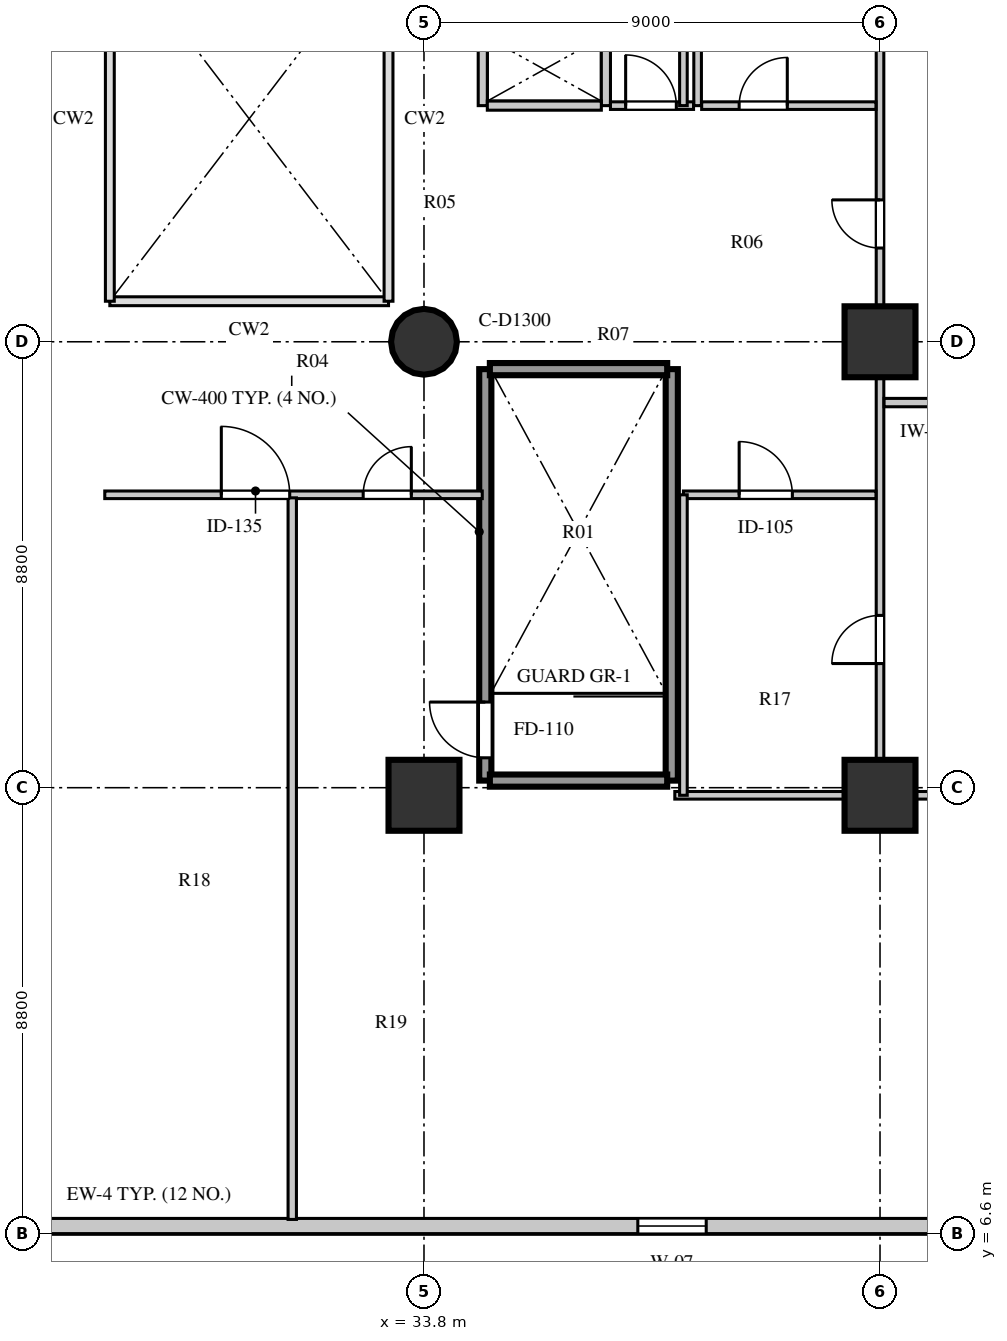
"""IFC4 building model, lengths in metres.
Left out: names, types, materials, properties, quantities, classifications, styles, units other than length and angle.
Written with IfcOpenShell. Run it as: python <this file> out.ifc"""

import sys

from ifc_helpers import new_model, si_unit, direction, frame, frame_2d, origin, origin_2d, place, context, subcontext, project, spatial, rectangle, circle, extrude, element, fill, save


model = new_model("IFC4")
c1 = context("Model", 3, precision=1e-05, world=origin(), true_north=direction((0.0, 1.0)))
c2 = subcontext(c1, "Body", "Model", "MODEL_VIEW")
j1 = project(units=[si_unit("LENGTHUNIT", "METRE"), si_unit("PLANEANGLEUNIT", "RADIAN")], contexts=[c1])
p1 = place(None, origin())
s1 = spatial("IfcSite", under=j1, at=p1, CompositionType="ELEMENT")
p2 = place(p1, origin())
s2 = spatial("IfcBuilding", under=s1, at=p2, CompositionType="ELEMENT")
p3 = place(p2, frame((0.0, 0.0, 21.5)))
s3 = spatial("IfcBuildingStorey", under=s2, at=p3, CompositionType="ELEMENT", Elevation=21.5)
p4 = place(p3, frame((33.8, 15.25, 0.0), z_axis=(0.0, 0.0, 1.0), x_axis=(1.0, 0.0, 0.0)))
e1 = element("IfcColumn", 1, at=p4, inside=s3, PredefinedType="COLUMN", context=c2, shape_type="SweptSolid", body=[
    extrude(rectangle(XDim=1.4, YDim=1.4, at=origin_2d()), origin(), (0.0, 0.0, 1.0), 4.22),
])
p5 = place(p3, frame((33.8, 24.2, 0.0), z_axis=(0.0, 0.0, 1.0), x_axis=(1.0, 0.0, 0.0)))
e2 = element("IfcColumn", 2, at=p5, inside=s3, PredefinedType="COLUMN", context=c2, shape_type="SweptSolid", body=[
    extrude(circle(Radius=0.65, at=origin_2d()), origin(), (0.0, 0.0, 1.0), 4.22),
])
for number, where, z_axis, x_axis in (
    (3, (42.8, 15.25, 0.0), (0.0, 0.0, 1.0), (1.0, 0.0, 0.0)),
    (4, (42.8, 24.2, 0.0), (0.0, 0.0, 1.0), (1.0, 0.0, 0.0)),
):
    element("IfcColumn", number, at=place(p3, frame(where, z_axis=z_axis, x_axis=x_axis)), inside=s3, PredefinedType="COLUMN", context=c2, shape_type="SweptSolid", body=[
        extrude(rectangle(XDim=1.4, YDim=1.4, at=origin_2d()), origin(), (0.0, 0.0, 1.0), 4.22),
    ])
p6 = place(p3, frame((12.3, 6.75, 0.0), z_axis=(0.0, 0.0, 1.0), x_axis=(1.0, 0.0, 0.0)))
e5 = element("IfcWall", 5, at=p6, inside=s3, PredefinedType="STANDARD", context=c2, shape_type="SweptSolid", body=[
    extrude(rectangle(XDim=34.0, YDim=0.3, at=frame_2d((17.0, 0.0))), origin(), (0.0, 0.0, 1.0), 4.22),
])
p7 = place(p6, frame((8.455, 0.0, 0.8)))
e6 = element("IfcOpeningElement", 6, at=p7, cuts=e5, PredefinedType="OPENING", context=c2, shape_type="SweptSolid", body=[
    extrude(rectangle(XDim=2.1, YDim=1.95, at=frame_2d((1.05, 0.975))), frame((0.0, 0.16, 0.0), z_axis=(0.0, -1.0, 0.0), x_axis=(1.0, 0.0, 0.0)), (0.0, 0.0, 1.0), 0.32),
])
p8 = place(p6, frame((25.72, 0.0, 0.8)))
e7 = element("IfcOpeningElement", 7, at=p8, cuts=e5, PredefinedType="OPENING", context=c2, shape_type="SweptSolid", body=[
    extrude(rectangle(XDim=1.35, YDim=1.9, at=frame_2d((0.675, 0.95))), frame((0.0, 0.16, 0.0), z_axis=(0.0, -1.0, 0.0), x_axis=(1.0, 0.0, 0.0)), (0.0, 0.0, 1.0), 0.32),
])
p9 = place(p3, frame((34.96, 28.86, 0.0), z_axis=(0.0, 0.0, 1.0), x_axis=(0.0, 1.0, 0.0)))
e8 = element("IfcWall", 8, at=p9, inside=s3, PredefinedType="SOLIDWALL", context=c2, shape_type="SweptSolid", body=[
    extrude(rectangle(XDim=4.22, YDim=0.18, at=frame_2d((2.11, 0.0))), origin(), (0.0, 0.0, 1.0), 4.22),
])
p10 = place(p3, frame((37.39, 28.86, 0.0), z_axis=(0.0, 0.0, 1.0), x_axis=(0.0, 1.0, 0.0)))
e9 = element("IfcWall", 9, at=p10, inside=s3, PredefinedType="SOLIDWALL", context=c2, shape_type="SweptSolid", body=[
    extrude(rectangle(XDim=4.22, YDim=0.18, at=frame_2d((2.11, 0.0))), origin(), (0.0, 0.0, 1.0), 4.22),
])
p11 = place(p10, frame((2.1, 0.0, 0.0)))
e10 = element("IfcOpeningElement", 10, at=p11, cuts=e9, PredefinedType="OPENING", context=c2, shape_type="SweptSolid", body=[
    extrude(rectangle(XDim=1.2, YDim=2.12, at=frame_2d((0.6, 1.06))), frame((0.0, 0.1, 0.0), z_axis=(0.0, -1.0, 0.0), x_axis=(1.0, 0.0, 0.0)), (0.0, 0.0, 1.0), 0.2),
])
p12 = place(p3, frame((35.05, 28.86, 0.0), z_axis=(0.0, 0.0, 1.0), x_axis=(1.0, 0.0, 0.0)))
e11 = element("IfcWall", 11, at=p12, inside=s3, PredefinedType="SOLIDWALL", context=c2, shape_type="SweptSolid", body=[
    extrude(rectangle(XDim=2.25, YDim=0.18, at=frame_2d((1.125, 0.0))), origin(), (0.0, 0.0, 1.0), 4.22),
])
p13 = place(p3, frame((39.2, 28.86, 0.0), z_axis=(0.0, 0.0, 1.0), x_axis=(0.0, 1.0, 0.0)))
e12 = element("IfcWall", 12, at=p13, inside=s3, PredefinedType="PARTITIONING", context=c2, shape_type="SweptSolid", body=[
    extrude(rectangle(XDim=4.22, YDim=0.15, at=frame_2d((2.11, 0.0))), origin(), (0.0, 0.0, 1.0), 4.22),
])
p14 = place(p3, frame((37.48, 28.86, 0.0), z_axis=(0.0, 0.0, 1.0), x_axis=(1.0, 0.0, 0.0)))
e13 = element("IfcWall", 13, at=p14, inside=s3, PredefinedType="PARTITIONING", context=c2, shape_type="SweptSolid", body=[
    extrude(rectangle(XDim=1.64, YDim=0.15, at=frame_2d((0.82, 0.0))), origin(), (0.0, 0.0, 1.0), 4.22),
])
p15 = place(p14, frame((0.3, 0.0, 0.0)))
e14 = element("IfcOpeningElement", 14, at=p15, cuts=e13, PredefinedType="OPENING", context=c2, shape_type="SweptSolid", body=[
    extrude(rectangle(XDim=1.0, YDim=2.1, at=frame_2d((0.5, 1.05))), frame((0.0, 0.085, 0.0), z_axis=(0.0, -1.0, 0.0), x_axis=(1.0, 0.0, 0.0)), (0.0, 0.0, 1.0), 0.17),
])
p16 = place(p3, frame((35.01, 15.54, 0.0), z_axis=(0.0, 0.0, 1.0), x_axis=(0.0, 1.0, 0.0)))
e15 = element("IfcWall", 15, at=p16, inside=s3, PredefinedType="SHEAR", context=c2, shape_type="SweptSolid", body=[
    extrude(rectangle(XDim=8.12, YDim=0.24, at=frame_2d((4.06, 0.0))), origin(), (0.0, 0.0, 1.0), 4.5),
])
p17 = place(p16, frame((0.45, 0.0, 0.0)))
e16 = element("IfcOpeningElement", 16, at=p17, cuts=e15, PredefinedType="OPENING", context=c2, shape_type="SweptSolid", body=[
    extrude(rectangle(XDim=1.1, YDim=2.1, at=frame_2d((0.55, 1.05))), frame((0.0, 0.13, 0.0), z_axis=(0.0, -1.0, 0.0), x_axis=(1.0, 0.0, 0.0)), (0.0, 0.0, 1.0), 0.26),
])
p18 = place(p3, frame((38.69, 15.54, 0.0), z_axis=(0.0, 0.0, 1.0), x_axis=(0.0, 1.0, 0.0)))
e17 = element("IfcWall", 17, at=p18, inside=s3, PredefinedType="SHEAR", context=c2, shape_type="SweptSolid", body=[
    extrude(rectangle(XDim=8.12, YDim=0.24, at=frame_2d((4.06, 0.0))), origin(), (0.0, 0.0, 1.0), 4.5),
])
for number, where, z_axis, x_axis in (
    (18, (35.1, 15.54, 0.0), (0.0, 0.0, 1.0), (1.0, 0.0, 0.0)),
    (19, (35.1, 23.66, 0.0), (0.0, 0.0, 1.0), (1.0, 0.0, 0.0)),
):
    element("IfcWall", number, at=place(p3, frame(where, z_axis=z_axis, x_axis=x_axis)), inside=s3, PredefinedType="SHEAR", context=c2, shape_type="SweptSolid", body=[
        extrude(rectangle(XDim=3.5, YDim=0.24, at=frame_2d((1.75, 0.0))), origin(), (0.0, 0.0, 1.0), 4.5),
    ])
p19 = place(p3, frame((27.5, 21.18, 0.0), z_axis=(0.0, 0.0, 1.0), x_axis=(1.0, 0.0, 0.0)))
e20 = element("IfcWall", 20, at=p19, inside=s3, PredefinedType="PARTITIONING", context=c2, shape_type="SweptSolid", body=[
    extrude(rectangle(XDim=7.45, YDim=0.15, at=frame_2d((3.725, 0.0))), origin(), (0.0, 0.0, 1.0), 3.82),
])
p20 = place(p19, frame((5.1, 0.0, 0.0)))
e21 = element("IfcOpeningElement", 21, at=p20, cuts=e20, PredefinedType="OPENING", context=c2, shape_type="SweptSolid", body=[
    extrude(rectangle(XDim=0.95, YDim=2.08, at=frame_2d((0.475, 1.04))), frame((0.0, 0.085, 0.0), z_axis=(0.0, -1.0, 0.0), x_axis=(1.0, 0.0, 0.0)), (0.0, 0.0, 1.0), 0.17),
])
p21 = place(p19, frame((2.3, 0.0, 0.0)))
e22 = element("IfcOpeningElement", 22, at=p21, cuts=e20, PredefinedType="OPENING", context=c2, shape_type="SweptSolid", body=[
    extrude(rectangle(XDim=1.35, YDim=2.1, at=frame_2d((0.675, 1.05))), frame((0.0, 0.085, 0.0), z_axis=(0.0, -1.0, 0.0), x_axis=(1.0, 0.0, 0.0)), (0.0, 0.0, 1.0), 0.17),
])
p22 = place(p3, frame((42.8, 15.25, 0.0), z_axis=(0.0, 0.0, 1.0), x_axis=(0.0, 1.0, 0.0)))
e23 = element("IfcWall", 23, at=p22, inside=s3, PredefinedType="PARTITIONING", context=c2, shape_type="SweptSolid", body=[
    extrude(rectangle(XDim=26.7, YDim=0.15, at=frame_2d((13.35, 0.0))), origin(), (0.0, 0.0, 1.0), 3.42),
])
p23 = place(p22, frame((2.6, 0.0, 0.0)))
e24 = element("IfcOpeningElement", 24, at=p23, cuts=e23, PredefinedType="OPENING", context=c2, shape_type="SweptSolid", body=[
    extrude(rectangle(XDim=0.95, YDim=2.08, at=frame_2d((0.475, 1.04))), frame((0.0, 0.085, 0.0), z_axis=(0.0, -1.0, 0.0), x_axis=(1.0, 0.0, 0.0)), (0.0, 0.0, 1.0), 0.17),
])
p24 = place(p22, frame((10.8, 0.0, 0.0)))
e25 = element("IfcOpeningElement", 25, at=p24, cuts=e23, PredefinedType="OPENING", context=c2, shape_type="SweptSolid", body=[
    extrude(rectangle(XDim=0.95, YDim=2.08, at=frame_2d((0.475, 1.04))), frame((0.0, 0.085, 0.0), z_axis=(0.0, -1.0, 0.0), x_axis=(1.0, 0.0, 0.0)), (0.0, 0.0, 1.0), 0.17),
])
p25 = place(p22, frame((15.7, 0.0, 0.0)))
e26 = element("IfcOpeningElement", 26, at=p25, cuts=e23, PredefinedType="OPENING", context=c2, shape_type="SweptSolid", body=[
    extrude(rectangle(XDim=1.1, YDim=2.12, at=frame_2d((0.55, 1.06))), frame((0.0, 0.085, 0.0), z_axis=(0.0, -1.0, 0.0), x_axis=(1.0, 0.0, 0.0)), (0.0, 0.0, 1.0), 0.17),
])
p26 = place(p22, frame((20.6, 0.0, 0.0)))
e27 = element("IfcOpeningElement", 27, at=p26, cuts=e23, PredefinedType="OPENING", context=c2, shape_type="SweptSolid", body=[
    extrude(rectangle(XDim=0.9, YDim=2.05, at=frame_2d((0.45, 1.025))), frame((0.0, 0.085, 0.0), z_axis=(0.0, -1.0, 0.0), x_axis=(1.0, 0.0, 0.0)), (0.0, 0.0, 1.0), 0.17),
])
p27 = place(p22, frame((24.1, 0.0, 0.0)))
e28 = element("IfcOpeningElement", 28, at=p27, cuts=e23, PredefinedType="OPENING", context=c2, shape_type="SweptSolid", body=[
    extrude(rectangle(XDim=0.95, YDim=2.05, at=frame_2d((0.475, 1.025))), frame((0.0, 0.085, 0.0), z_axis=(0.0, -1.0, 0.0), x_axis=(1.0, 0.0, 0.0)), (0.0, 0.0, 1.0), 0.17),
])
p28 = place(p3, frame((38.75, 15.25, 0.0), z_axis=(0.0, 0.0, 1.0), x_axis=(1.0, 0.0, 0.0)))
e29 = element("IfcWall", 29, at=p28, inside=s3, PredefinedType="PARTITIONING", context=c2, shape_type="SweptSolid", body=[
    extrude(rectangle(XDim=12.7, YDim=0.15, at=frame_2d((6.35, 0.0))), origin(), (0.0, 0.0, 1.0), 3.42),
])
p29 = place(p3, frame((38.92, 21.18, 0.0), z_axis=(0.0, 0.0, 1.0), x_axis=(1.0, 0.0, 0.0)))
e30 = element("IfcWall", 30, at=p29, inside=s3, PredefinedType="PARTITIONING", context=c2, shape_type="SweptSolid", body=[
    extrude(rectangle(XDim=3.8, YDim=0.15, at=frame_2d((1.9, 0.0))), origin(), (0.0, 0.0, 1.0), 4.22),
])
p30 = place(p29, frame((1.1, 0.0, 0.0)))
e31 = element("IfcOpeningElement", 31, at=p30, cuts=e30, PredefinedType="OPENING", context=c2, shape_type="SweptSolid", body=[
    extrude(rectangle(XDim=1.05, YDim=2.1, at=frame_2d((0.525, 1.05))), frame((0.0, 0.085, 0.0), z_axis=(0.0, -1.0, 0.0), x_axis=(1.0, 0.0, 0.0)), (0.0, 0.0, 1.0), 0.17),
])
p31 = place(p3, frame((38.92, 15.25, 0.0), z_axis=(0.0, 0.0, 1.0), x_axis=(0.0, 1.0, 0.0)))
e32 = element("IfcWall", 32, at=p31, inside=s3, PredefinedType="PARTITIONING", context=c2, shape_type="SweptSolid", body=[
    extrude(rectangle(XDim=5.93, YDim=0.15, at=frame_2d((2.965, 0.0))), origin(), (0.0, 0.0, 1.0), 4.22),
])
p32 = place(p3, frame((39.28, 28.86, 0.0), z_axis=(0.0, 0.0, 1.0), x_axis=(1.0, 0.0, 0.0)))
e33 = element("IfcWall", 33, at=p32, inside=s3, PredefinedType="PARTITIONING", context=c2, shape_type="SweptSolid", body=[
    extrude(rectangle(XDim=3.44, YDim=0.15, at=frame_2d((1.72, 0.0))), origin(), (0.0, 0.0, 1.0), 4.22),
])
p33 = place(p32, frame((0.74, 0.0, 0.0)))
e34 = element("IfcOpeningElement", 34, at=p33, cuts=e33, PredefinedType="OPENING", context=c2, shape_type="SweptSolid", body=[
    extrude(rectangle(XDim=0.95, YDim=2.08, at=frame_2d((0.475, 1.04))), frame((0.0, 0.085, 0.0), z_axis=(0.0, -1.0, 0.0), x_axis=(1.0, 0.0, 0.0)), (0.0, 0.0, 1.0), 0.17),
])
p34 = place(p3, frame((38.92, 28.86, 0.0), z_axis=(0.0, 0.0, 1.0), x_axis=(0.0, 1.0, 0.0)))
e35 = element("IfcWall", 35, at=p34, inside=s3, PredefinedType="PARTITIONING", context=c2, shape_type="SweptSolid", body=[
    extrude(rectangle(XDim=13.09, YDim=0.15, at=frame_2d((6.545, 0.0))), origin(), (0.0, 0.0, 1.0), 4.22),
])
p35 = place(p3, frame((42.88, 23.0, 0.0), z_axis=(0.0, 0.0, 1.0), x_axis=(1.0, 0.0, 0.0)))
e36 = element("IfcWall", 36, at=p35, inside=s3, PredefinedType="PARTITIONING", context=c2, shape_type="SweptSolid", body=[
    extrude(rectangle(XDim=8.57, YDim=0.165, at=frame_2d((4.285, 0.0))), origin(), (0.0, 0.0, 1.0), 4.22),
])
p36 = place(p3, frame((31.2, 6.88, 0.0), z_axis=(0.0, 0.0, 1.0), x_axis=(0.0, 1.0, 0.0)))
e37 = element("IfcWall", 37, at=p36, inside=s3, PredefinedType="PARTITIONING", context=c2, shape_type="SweptSolid", body=[
    extrude(rectangle(XDim=14.24, YDim=0.165, at=frame_2d((7.12, 0.0))), origin(), (0.0, 0.0, 1.0), 4.22),
])
p37 = place(p8, origin())
e38 = element("IfcWindow", 38, at=p37, inside=s3, PartitioningType="SINGLE_PANEL", PredefinedType="WINDOW", context=c2, shape_type="SweptSolid", body=[
    extrude(rectangle(XDim=1.35, YDim=1.9, at=frame_2d((0.675, 0.95))), frame((0.0, 0.03, 0.0), z_axis=(0.0, -1.0, 0.0), x_axis=(1.0, 0.0, 0.0)), (0.0, 0.0, 1.0), 0.06),
])
fill(e7, e38)
p38 = place(p15, origin())
e39 = element("IfcDoor", 39, at=p38, inside=s3, OperationType="SINGLE_SWING_LEFT", PredefinedType="DOOR", context=c2, shape_type="SweptSolid", body=[
    extrude(rectangle(XDim=1.0, YDim=2.1, at=frame_2d((0.5, 1.05))), frame((0.0, 0.025, 0.0), z_axis=(0.0, -1.0, 0.0), x_axis=(1.0, 0.0, 0.0)), (0.0, 0.0, 1.0), 0.05),
])
fill(e14, e39)
p39 = place(p17, origin())
e40 = element("IfcDoor", 40, at=p39, inside=s3, OperationType="SINGLE_SWING_RIGHT", PredefinedType="DOOR", context=c2, shape_type="SweptSolid", body=[
    extrude(rectangle(XDim=1.1, YDim=2.1, at=frame_2d((0.55, 1.05))), frame((0.0, 0.025, 0.0), z_axis=(0.0, -1.0, 0.0), x_axis=(1.0, 0.0, 0.0)), (0.0, 0.0, 1.0), 0.05),
])
fill(e16, e40)
p40 = place(p30, origin())
e41 = element("IfcDoor", 41, at=p40, inside=s3, OperationType="SINGLE_SWING_LEFT", PredefinedType="DOOR", context=c2, shape_type="SweptSolid", body=[
    extrude(rectangle(XDim=1.05, YDim=2.1, at=frame_2d((0.525, 1.05))), frame((0.0, 0.025, 0.0), z_axis=(0.0, -1.0, 0.0), x_axis=(1.0, 0.0, 0.0)), (0.0, 0.0, 1.0), 0.05),
])
fill(e31, e41)
p41 = place(p33, frame((0.95, 0.0, 0.0), z_axis=(0.0, 0.0, 1.0), x_axis=(-1.0, 0.0, 0.0)))
e42 = element("IfcDoor", 42, at=p41, inside=s3, OperationType="SINGLE_SWING_LEFT", PredefinedType="DOOR", context=c2, shape_type="SweptSolid", body=[
    extrude(rectangle(XDim=0.95, YDim=2.08, at=frame_2d((0.475, 1.04))), frame((0.0, 0.025, 0.0), z_axis=(0.0, -1.0, 0.0), x_axis=(1.0, 0.0, 0.0)), (0.0, 0.0, 1.0), 0.05),
])
fill(e34, e42)
p42 = place(p20, frame((0.95, 0.0, 0.0), z_axis=(0.0, 0.0, 1.0), x_axis=(-1.0, 0.0, 0.0)))
e43 = element("IfcDoor", 43, at=p42, inside=s3, OperationType="SINGLE_SWING_LEFT", PredefinedType="DOOR", context=c2, shape_type="SweptSolid", body=[
    extrude(rectangle(XDim=0.95, YDim=2.08, at=frame_2d((0.475, 1.04))), frame((0.0, 0.025, 0.0), z_axis=(0.0, -1.0, 0.0), x_axis=(1.0, 0.0, 0.0)), (0.0, 0.0, 1.0), 0.05),
])
fill(e21, e43)
p43 = place(p21, frame((1.35, 0.0, 0.0), z_axis=(0.0, 0.0, 1.0), x_axis=(-1.0, 0.0, 0.0)))
e44 = element("IfcDoor", 44, at=p43, inside=s3, OperationType="SINGLE_SWING_RIGHT", PredefinedType="DOOR", context=c2, shape_type="SweptSolid", body=[
    extrude(rectangle(XDim=1.35, YDim=2.1, at=frame_2d((0.675, 1.05))), frame((0.0, 0.025, 0.0), z_axis=(0.0, -1.0, 0.0), x_axis=(1.0, 0.0, 0.0)), (0.0, 0.0, 1.0), 0.05),
])
fill(e22, e44)
p44 = place(p23, origin())
e45 = element("IfcDoor", 45, at=p44, inside=s3, OperationType="SINGLE_SWING_LEFT", PredefinedType="DOOR", context=c2, shape_type="SweptSolid", body=[
    extrude(rectangle(XDim=0.95, YDim=2.08, at=frame_2d((0.475, 1.04))), frame((0.0, 0.025, 0.0), z_axis=(0.0, -1.0, 0.0), x_axis=(1.0, 0.0, 0.0)), (0.0, 0.0, 1.0), 0.05),
])
fill(e24, e45)
p45 = place(p24, origin())
e46 = element("IfcDoor", 46, at=p45, inside=s3, OperationType="SINGLE_SWING_RIGHT", PredefinedType="DOOR", context=c2, shape_type="SweptSolid", body=[
    extrude(rectangle(XDim=0.95, YDim=2.08, at=frame_2d((0.475, 1.04))), frame((0.0, 0.025, 0.0), z_axis=(0.0, -1.0, 0.0), x_axis=(1.0, 0.0, 0.0)), (0.0, 0.0, 1.0), 0.05),
])
fill(e25, e46)
save(model, sys.argv[1])
